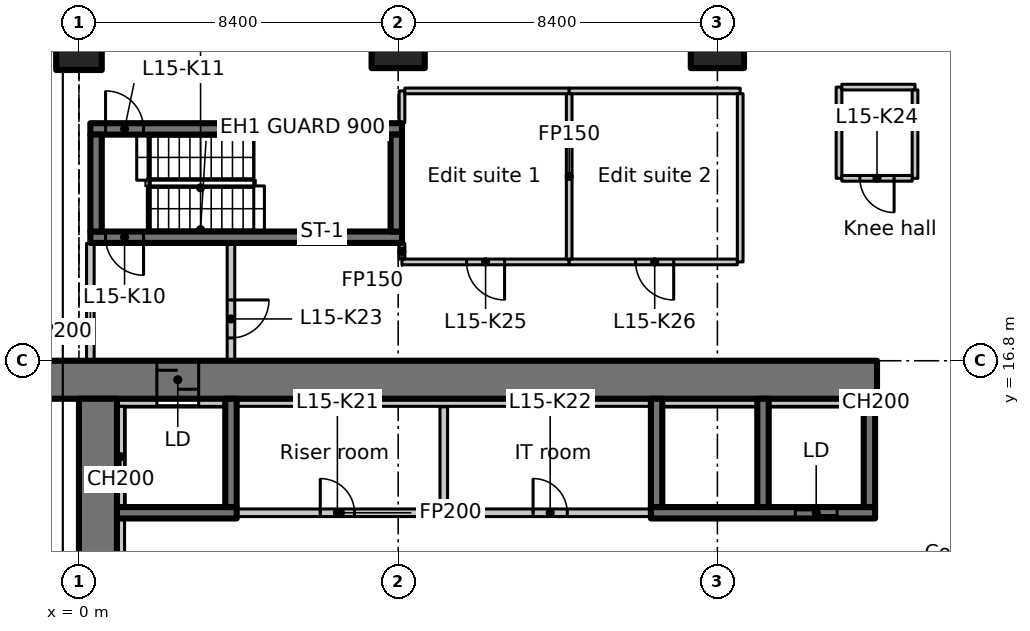
"""IFC4 building model, lengths in metres.
Left out: names, types, materials, properties, quantities, classifications, styles, units other than length and angle.
Written with IfcOpenShell. Run it as: python <this file> out.ifc"""

import sys

from ifc_helpers import new_model, si_unit, direction, frame, frame_2d, origin, origin_2d, place, context, subcontext, project, spatial, rectangle, extrude, element, fill, save


model = new_model("IFC4")
c1 = context("Model", 3, precision=1e-05, world=origin(), true_north=direction((0.0, 1.0)))
c2 = subcontext(c1, "Body", "Model", "MODEL_VIEW")
j1 = project(units=[si_unit("LENGTHUNIT", "METRE"), si_unit("PLANEANGLEUNIT", "RADIAN")], contexts=[c1])
p1 = place(None, origin())
s1 = spatial("IfcSite", under=j1, at=p1, CompositionType="ELEMENT")
p2 = place(p1, origin())
s2 = spatial("IfcBuilding", under=s1, at=p2, CompositionType="ELEMENT")
p3 = place(p2, frame((0.0, 0.0, 68.9)))
s3 = spatial("IfcBuildingStorey", under=s2, at=p3, CompositionType="ELEMENT", Elevation=68.9)
p4 = place(p3, frame((0.0, 25.2, 0.0), z_axis=(0.0, 0.0, 1.0), x_axis=(1.0, 0.0, 0.0)))
e1 = element("IfcColumn", 1, at=p4, inside=s3, PredefinedType="COLUMN", context=c2, shape_type="SweptSolid", body=[
    extrude(rectangle(XDim=1.2, YDim=1.5, at=origin_2d()), origin(), (0.0, 0.0, 1.0), 3.35),
])
for number, where, z_axis, x_axis in (
    (2, (8.4, 25.2, 0.0), (0.0, 0.0, 1.0), (1.0, 0.0, 0.0)),
    (3, (16.8, 25.2, 0.0), (0.0, 0.0, 1.0), (1.0, 0.0, 0.0)),
):
    element("IfcColumn", number, at=place(p3, frame(where, z_axis=z_axis, x_axis=x_axis)), inside=s3, PredefinedType="COLUMN", context=c2, shape_type="SweptSolid", body=[
        extrude(rectangle(XDim=1.4, YDim=1.4, at=origin_2d()), origin(), (0.0, 0.0, 1.0), 3.35),
    ])
p5 = place(p3, frame((-1.1, 16.3, 0.0), z_axis=(0.0, 0.0, 1.0), x_axis=(1.0, 0.0, 0.0)))
e4 = element("IfcWall", 4, at=p5, inside=s3, PredefinedType="SHEAR", context=c2, shape_type="SweptSolid", body=[
    extrude(rectangle(XDim=22.1, YDim=1.0, at=frame_2d((11.05, 0.0))), origin(), (0.0, 0.0, 1.0), 3.35),
])
p6 = place(p5, frame((3.15, 0.0, 0.0)))
e5 = element("IfcOpeningElement", 5, at=p6, cuts=e4, PredefinedType="OPENING", context=c2, shape_type="SweptSolid", body=[
    extrude(rectangle(XDim=1.1, YDim=2.3, at=frame_2d((0.55, 1.15))), frame((0.0, 0.51, 0.0), z_axis=(0.0, -1.0, 0.0), x_axis=(1.0, 0.0, 0.0)), (0.0, 0.0, 1.0), 1.02),
])
p7 = place(p3, frame((0.5, 6.936, 0.0), z_axis=(0.0, 0.0, 1.0), x_axis=(0.0, 1.0, 0.0)))
e6 = element("IfcWall", 6, at=p7, inside=s3, PredefinedType="SHEAR", context=c2, shape_type="SweptSolid", body=[
    extrude(rectangle(XDim=8.864, YDim=1.0, at=frame_2d((4.432, 0.0))), origin(), (0.0, 0.0, 1.0), 3.35),
])
p8 = place(p3, frame((1.0, 15.7, 0.0), z_axis=(0.0, 0.0, 1.0), x_axis=(1.0, 0.0, 0.0)))
e7 = element("IfcWall", 7, at=p8, inside=s3, PredefinedType="PARTITIONING", context=c2, shape_type="SweptSolid", body=[
    extrude(rectangle(XDim=1.05, YDim=0.2, at=frame_2d((0.525, 0.0))), origin(), (0.0, 0.0, 1.0), 3.35),
])
p9 = place(p3, frame((1.0, 12.8, 0.0), z_axis=(0.0, 0.0, 1.0), x_axis=(1.0, 0.0, 0.0)))
e8 = element("IfcWall", 8, at=p9, inside=s3, PredefinedType="SHEAR", context=c2, shape_type="SweptSolid", body=[
    extrude(rectangle(XDim=3.15, YDim=0.3, at=frame_2d((1.575, 0.0))), origin(), (0.0, 0.0, 1.0), 3.35),
])
p10 = place(p3, frame((4.0, 12.95, 0.0), z_axis=(0.0, 0.0, 1.0), x_axis=(0.0, 1.0, 0.0)))
e9 = element("IfcWall", 9, at=p10, inside=s3, PredefinedType="SHEAR", context=c2, shape_type="SweptSolid", body=[
    extrude(rectangle(XDim=2.85, YDim=0.3, at=frame_2d((1.425, 0.0))), origin(), (0.0, 0.0, 1.0), 3.35),
])
p11 = place(p3, frame((15.05, 12.8, 0.0), z_axis=(0.0, 0.0, 1.0), x_axis=(1.0, 0.0, 0.0)))
e10 = element("IfcWall", 10, at=p11, inside=s3, PredefinedType="SHEAR", context=c2, shape_type="SweptSolid", body=[
    extrude(rectangle(XDim=5.9, YDim=0.3, at=frame_2d((2.95, 0.0))), origin(), (0.0, 0.0, 1.0), 3.35),
])
p12 = place(p11, frame((3.8, 0.0, 0.0)))
e11 = element("IfcOpeningElement", 11, at=p12, cuts=e10, PredefinedType="OPENING", context=c2, shape_type="SweptSolid", body=[
    extrude(rectangle(XDim=1.1, YDim=2.3, at=frame_2d((0.55, 1.15))), frame((0.0, 0.16, 0.0), z_axis=(0.0, -1.0, 0.0), x_axis=(1.0, 0.0, 0.0)), (0.0, 0.0, 1.0), 0.32),
])
for number, where, z_axis, x_axis in (
    (12, (15.2, 12.95, 0.0), (0.0, 0.0, 1.0), (0.0, 1.0, 0.0)),
    (13, (18.0, 12.95, 0.0), (0.0, 0.0, 1.0), (0.0, 1.0, 0.0)),
    (14, (20.8, 12.95, 0.0), (0.0, 0.0, 1.0), (0.0, 1.0, 0.0)),
):
    element("IfcWall", number, at=place(p3, frame(where, z_axis=z_axis, x_axis=x_axis)), inside=s3, PredefinedType="SHEAR", context=c2, shape_type="SweptSolid", body=[
        extrude(rectangle(XDim=2.85, YDim=0.3, at=frame_2d((1.425, 0.0))), origin(), (0.0, 0.0, 1.0), 3.35),
    ])
p13 = place(p3, frame((8.5, 20.05, 0.0), z_axis=(0.0, 0.0, 1.0), x_axis=(-1.0, 0.0, 0.0)))
e15 = element("IfcWall", 15, at=p13, inside=s3, PredefinedType="SHEAR", context=c2, shape_type="SweptSolid", body=[
    extrude(rectangle(XDim=8.2, YDim=0.3, at=frame_2d((4.1, 0.0))), origin(), (0.0, 0.0, 1.0), 3.35),
])
p14 = place(p13, frame((6.8, 0.0, 0.0)))
e16 = element("IfcOpeningElement", 16, at=p14, cuts=e15, PredefinedType="OPENING", context=c2, shape_type="SweptSolid", body=[
    extrude(rectangle(XDim=1.0, YDim=2.1, at=frame_2d((0.5, 1.05))), frame((0.0, 0.16, 0.0), z_axis=(0.0, -1.0, 0.0), x_axis=(1.0, 0.0, 0.0)), (0.0, 0.0, 1.0), 0.32),
])
p15 = place(p3, frame((0.3, 22.9, 0.0), z_axis=(0.0, 0.0, 1.0), x_axis=(1.0, 0.0, 0.0)))
e17 = element("IfcWall", 17, at=p15, inside=s3, PredefinedType="SHEAR", context=c2, shape_type="SweptSolid", body=[
    extrude(rectangle(XDim=8.2, YDim=0.3, at=frame_2d((4.1, 0.0))), origin(), (0.0, 0.0, 1.0), 3.35),
])
p16 = place(p15, frame((0.4, 0.0, 0.0)))
e18 = element("IfcOpeningElement", 18, at=p16, cuts=e17, PredefinedType="OPENING", context=c2, shape_type="SweptSolid", body=[
    extrude(rectangle(XDim=1.0, YDim=2.1, at=frame_2d((0.5, 1.05))), frame((0.0, 0.16, 0.0), z_axis=(0.0, -1.0, 0.0), x_axis=(1.0, 0.0, 0.0)), (0.0, 0.0, 1.0), 0.32),
])
for number, where, z_axis, x_axis in (
    (19, (0.45, 20.2, 0.0), (0.0, 0.0, 1.0), (0.0, 1.0, 0.0)),
    (20, (8.35, 20.2, 0.0), (0.0, 0.0, 1.0), (0.0, 1.0, 0.0)),
):
    element("IfcWall", number, at=place(p3, frame(where, z_axis=z_axis, x_axis=x_axis)), inside=s3, PredefinedType="SHEAR", context=c2, shape_type="SweptSolid", body=[
        extrude(rectangle(XDim=2.55, YDim=0.3, at=frame_2d((1.275, 0.0))), origin(), (0.0, 0.0, 1.0), 3.35),
    ])
p17 = place(p3, frame((0.3, 16.812, 0.0), z_axis=(0.0, 0.0, 1.0), x_axis=(0.0, 1.0, 0.0)))
e21 = element("IfcWall", 21, at=p17, inside=s3, PredefinedType="PARTITIONING", context=c2, shape_type="SweptSolid", body=[
    extrude(rectangle(XDim=3.076, YDim=0.2, at=frame_2d((1.538, 0.0))), origin(), (0.0, 0.0, 1.0), 2.98),
])
p18 = place(p3, frame((4.0, 19.888, 0.0), z_axis=(0.0, 0.0, 1.0), x_axis=(0.0, -1.0, 0.0)))
e22 = element("IfcWall", 22, at=p18, inside=s3, PredefinedType="PARTITIONING", context=c2, shape_type="SweptSolid", body=[
    extrude(rectangle(XDim=3.076, YDim=0.2, at=frame_2d((1.538, 0.0))), origin(), (0.0, 0.0, 1.0), 3.35),
])
p19 = place(p18, frame((1.488, 0.0, 0.0)))
e23 = element("IfcOpeningElement", 23, at=p19, cuts=e22, PredefinedType="OPENING", context=c2, shape_type="SweptSolid", body=[
    extrude(rectangle(XDim=1.0, YDim=2.1, at=frame_2d((0.5, 1.05))), frame((0.0, 0.11, 0.0), z_axis=(0.0, -1.0, 0.0), x_axis=(1.0, 0.0, 0.0)), (0.0, 0.0, 1.0), 0.22),
])
p20 = place(p3, frame((4.162, 12.8, 0.0), z_axis=(0.0, 0.0, 1.0), x_axis=(1.0, 0.0, 0.0)))
e24 = element("IfcWall", 24, at=p20, inside=s3, PredefinedType="PARTITIONING", context=c2, shape_type="SweptSolid", body=[
    extrude(rectangle(XDim=5.438, YDim=0.2, at=frame_2d((2.719, 0.0))), origin(), (0.0, 0.0, 1.0), 3.35),
])
p21 = place(p20, frame((2.188, 0.0, 0.0)))
e25 = element("IfcOpeningElement", 25, at=p21, cuts=e24, PredefinedType="OPENING", context=c2, shape_type="SweptSolid", body=[
    extrude(rectangle(XDim=0.9, YDim=2.1, at=frame_2d((0.45, 1.05))), frame((0.0, 0.11, 0.0), z_axis=(0.0, -1.0, 0.0), x_axis=(1.0, 0.0, 0.0)), (0.0, 0.0, 1.0), 0.22),
])
p22 = place(p3, frame((9.6, 12.8, 0.0), z_axis=(0.0, 0.0, 1.0), x_axis=(1.0, 0.0, 0.0)))
e26 = element("IfcWall", 26, at=p22, inside=s3, PredefinedType="PARTITIONING", context=c2, shape_type="SweptSolid", body=[
    extrude(rectangle(XDim=5.438, YDim=0.2, at=frame_2d((2.719, 0.0))), origin(), (0.0, 0.0, 1.0), 3.35),
])
p23 = place(p22, frame((2.35, 0.0, 0.0)))
e27 = element("IfcOpeningElement", 27, at=p23, cuts=e26, PredefinedType="OPENING", context=c2, shape_type="SweptSolid", body=[
    extrude(rectangle(XDim=0.9, YDim=2.1, at=frame_2d((0.45, 1.05))), frame((0.0, 0.11, 0.0), z_axis=(0.0, -1.0, 0.0), x_axis=(1.0, 0.0, 0.0)), (0.0, 0.0, 1.0), 0.22),
])
p24 = place(p3, frame((9.6, 15.588, 0.0), z_axis=(0.0, 0.0, 1.0), x_axis=(0.0, -1.0, 0.0)))
e28 = element("IfcWall", 28, at=p24, inside=s3, PredefinedType="PARTITIONING", context=c2, shape_type="SweptSolid", body=[
    extrude(rectangle(XDim=2.688, YDim=0.2, at=frame_2d((1.344, 0.0))), origin(), (0.0, 0.0, 1.0), 3.35),
])
p25 = place(p3, frame((12.9, 19.4, 0.0), z_axis=(0.0, 0.0, 1.0), x_axis=(-1.0, 0.0, 0.0)))
e29 = element("IfcWall", 29, at=p25, inside=s3, PredefinedType="PARTITIONING", context=c2, shape_type="SweptSolid", body=[
    extrude(rectangle(XDim=4.4, YDim=0.15, at=frame_2d((2.2, 0.0))), origin(), (0.0, 0.0, 1.0), 3.35),
])
p26 = place(p25, frame((1.7, 0.0, 0.0)))
e30 = element("IfcOpeningElement", 30, at=p26, cuts=e29, PredefinedType="OPENING", context=c2, shape_type="SweptSolid", body=[
    extrude(rectangle(XDim=1.0, YDim=2.1, at=frame_2d((0.5, 1.05))), frame((0.0, 0.085, 0.0), z_axis=(0.0, -1.0, 0.0), x_axis=(1.0, 0.0, 0.0)), (0.0, 0.0, 1.0), 0.17),
])
p27 = place(p3, frame((8.5, 19.475, 0.0), z_axis=(0.0, 0.0, 1.0), x_axis=(0.0, 1.0, 0.0)))
e31 = element("IfcWall", 31, at=p27, inside=s3, PredefinedType="PARTITIONING", context=c2, shape_type="SweptSolid", body=[
    extrude(rectangle(XDim=0.413, YDim=0.15, at=frame_2d((0.207, 0.0))), origin(), (0.0, 0.0, 1.0), 3.35),
])
p28 = place(p3, frame((8.5, 23.062, 0.0), z_axis=(0.0, 0.0, 1.0), x_axis=(0.0, 1.0, 0.0)))
e32 = element("IfcWall", 32, at=p28, inside=s3, PredefinedType="PARTITIONING", context=c2, shape_type="SweptSolid", body=[
    extrude(rectangle(XDim=0.838, YDim=0.15, at=frame_2d((0.419, 0.0))), origin(), (0.0, 0.0, 1.0), 3.35),
])
p29 = place(p3, frame((8.575, 23.9, 0.0), z_axis=(0.0, 0.0, 1.0), x_axis=(1.0, 0.0, 0.0)))
e33 = element("IfcWall", 33, at=p29, inside=s3, PredefinedType="PARTITIONING", context=c2, shape_type="SweptSolid", body=[
    extrude(rectangle(XDim=4.325, YDim=0.15, at=frame_2d((2.163, 0.0))), origin(), (0.0, 0.0, 1.0), 3.35),
])
p30 = place(p3, frame((12.9, 23.9, 0.0), z_axis=(0.0, 0.0, 1.0), x_axis=(1.0, 0.0, 0.0)))
e34 = element("IfcWall", 34, at=p30, inside=s3, PredefinedType="PARTITIONING", context=c2, shape_type="SweptSolid", body=[
    extrude(rectangle(XDim=4.5, YDim=0.15, at=frame_2d((2.25, 0.0))), origin(), (0.0, 0.0, 1.0), 3.35),
])
p31 = place(p3, frame((17.4, 23.825, 0.0), z_axis=(0.0, 0.0, 1.0), x_axis=(0.0, -1.0, 0.0)))
e35 = element("IfcWall", 35, at=p31, inside=s3, PredefinedType="PARTITIONING", context=c2, shape_type="SweptSolid", body=[
    extrude(rectangle(XDim=4.425, YDim=0.15, at=frame_2d((2.212, 0.0))), origin(), (0.0, 0.0, 1.0), 3.35),
])
p32 = place(p3, frame((17.325, 19.4, 0.0), z_axis=(0.0, 0.0, 1.0), x_axis=(-1.0, 0.0, 0.0)))
e36 = element("IfcWall", 36, at=p32, inside=s3, PredefinedType="PARTITIONING", context=c2, shape_type="SweptSolid", body=[
    extrude(rectangle(XDim=4.425, YDim=0.15, at=frame_2d((2.212, 0.0))), origin(), (0.0, 0.0, 1.0), 3.35),
])
p33 = place(p32, frame((1.675, 0.0, 0.0)))
e37 = element("IfcOpeningElement", 37, at=p33, cuts=e36, PredefinedType="OPENING", context=c2, shape_type="SweptSolid", body=[
    extrude(rectangle(XDim=1.0, YDim=2.1, at=frame_2d((0.5, 1.05))), frame((0.0, 0.085, 0.0), z_axis=(0.0, -1.0, 0.0), x_axis=(1.0, 0.0, 0.0)), (0.0, 0.0, 1.0), 0.17),
])
p34 = place(p3, frame((12.9, 23.825, 0.0), z_axis=(0.0, 0.0, 1.0), x_axis=(0.0, -1.0, 0.0)))
e38 = element("IfcWall", 38, at=p34, inside=s3, PredefinedType="PARTITIONING", context=c2, shape_type="SweptSolid", body=[
    extrude(rectangle(XDim=4.35, YDim=0.15, at=frame_2d((2.175, 0.0))), origin(), (0.0, 0.0, 1.0), 3.35),
])
p35 = place(p3, frame((20.0, 21.6, 0.0), z_axis=(0.0, 0.0, 1.0), x_axis=(0.0, 1.0, 0.0)))
e39 = element("IfcWall", 39, at=p35, inside=s3, PredefinedType="PARTITIONING", context=c2, shape_type="SweptSolid", body=[
    extrude(rectangle(XDim=2.4, YDim=0.15, at=frame_2d((1.2, 0.0))), origin(), (0.0, 0.0, 1.0), 3.35),
])
p36 = place(p3, frame((20.075, 24.0, 0.0), z_axis=(0.0, 0.0, 1.0), x_axis=(1.0, 0.0, 0.0)))
e40 = element("IfcWall", 40, at=p36, inside=s3, PredefinedType="PARTITIONING", context=c2, shape_type="SweptSolid", body=[
    extrude(rectangle(XDim=1.925, YDim=0.15, at=frame_2d((0.962, 0.0))), origin(), (0.0, 0.0, 1.0), 3.35),
])
p37 = place(p3, frame((22.0, 23.925, 0.0), z_axis=(0.0, 0.0, 1.0), x_axis=(0.0, -1.0, 0.0)))
e41 = element("IfcWall", 41, at=p37, inside=s3, PredefinedType="PARTITIONING", context=c2, shape_type="SweptSolid", body=[
    extrude(rectangle(XDim=2.325, YDim=0.15, at=frame_2d((1.163, 0.0))), origin(), (0.0, 0.0, 1.0), 3.35),
])
p38 = place(p3, frame((21.925, 21.6, 0.0), z_axis=(0.0, 0.0, 1.0), x_axis=(-1.0, 0.0, 0.0)))
e42 = element("IfcWall", 42, at=p38, inside=s3, PredefinedType="PARTITIONING", context=c2, shape_type="SweptSolid", body=[
    extrude(rectangle(XDim=1.85, YDim=0.15, at=frame_2d((0.925, 0.0))), origin(), (0.0, 0.0, 1.0), 3.35),
])
p39 = place(p38, frame((0.475, 0.0, 0.0)))
e43 = element("IfcOpeningElement", 43, at=p39, cuts=e42, PredefinedType="OPENING", context=c2, shape_type="SweptSolid", body=[
    extrude(rectangle(XDim=0.9, YDim=2.1, at=frame_2d((0.45, 1.05))), frame((0.0, 0.085, 0.0), z_axis=(0.0, -1.0, 0.0), x_axis=(1.0, 0.0, 0.0)), (0.0, 0.0, 1.0), 0.17),
])
p40 = place(p3, frame((1.1, 9.75, 0.0), z_axis=(0.0, 0.0, 1.0), x_axis=(0.0, 1.0, 0.0)))
e44 = element("IfcWall", 44, at=p40, inside=s3, PredefinedType="PARTITIONING", context=c2, shape_type="SweptSolid", body=[
    extrude(rectangle(XDim=2.9, YDim=0.2, at=frame_2d((1.45, 0.0))), origin(), (0.0, 0.0, 1.0), 3.35),
])
p41 = place(p3, frame((1.1, 12.95, 0.0), z_axis=(0.0, 0.0, 1.0), x_axis=(0.0, 1.0, 0.0)))
e45 = element("IfcWall", 45, at=p41, inside=s3, PredefinedType="PARTITIONING", context=c2, shape_type="SweptSolid", body=[
    extrude(rectangle(XDim=2.65, YDim=0.2, at=frame_2d((1.325, 0.0))), origin(), (0.0, 0.0, 1.0), 3.35),
])
p42 = place(p3, frame((3.15, 15.7, 0.0), z_axis=(0.0, 0.0, 1.0), x_axis=(1.0, 0.0, 0.0)))
e46 = element("IfcWall", 46, at=p42, inside=s3, PredefinedType="PARTITIONING", context=c2, shape_type="SweptSolid", body=[
    extrude(rectangle(XDim=0.7, YDim=0.2, at=frame_2d((0.35, 0.0))), origin(), (0.0, 0.0, 1.0), 3.35),
])
p43 = place(p3, frame((4.15, 15.7, 0.0), z_axis=(0.0, 0.0, 1.0), x_axis=(1.0, 0.0, 0.0)))
e47 = element("IfcWall", 47, at=p43, inside=s3, PredefinedType="PARTITIONING", context=c2, shape_type="SweptSolid", body=[
    extrude(rectangle(XDim=10.9, YDim=0.2, at=frame_2d((5.45, 0.0))), origin(), (0.0, 0.0, 1.0), 3.35),
])
for number, where, z_axis, x_axis in (
    (48, (15.35, 15.7, 0.0), (0.0, 0.0, 1.0), (1.0, 0.0, 0.0)),
    (49, (18.15, 15.7, 0.0), (0.0, 0.0, 1.0), (1.0, 0.0, 0.0)),
):
    element("IfcWall", number, at=place(p3, frame(where, z_axis=z_axis, x_axis=x_axis)), inside=s3, PredefinedType="PARTITIONING", context=c2, shape_type="SweptSolid", body=[
        extrude(rectangle(XDim=2.5, YDim=0.2, at=frame_2d((1.25, 0.0))), origin(), (0.0, 0.0, 1.0), 3.35),
    ])
p44 = place(p3, frame((20.95, 15.7, 0.0), z_axis=(0.0, 0.0, 1.0), x_axis=(1.0, 0.0, 0.0)))
e50 = element("IfcWall", 50, at=p44, inside=s3, PredefinedType="PARTITIONING", context=c2, shape_type="SweptSolid", body=[
    extrude(rectangle(XDim=0.05, YDim=0.2, at=frame_2d((0.025, 0.0))), origin(), (0.0, 0.0, 1.0), 3.35),
])
p45 = place(p6, origin())
e51 = element("IfcDoor", 51, at=p45, inside=s3, OperationType="SLIDING_TO_LEFT", PredefinedType="DOOR", context=c2, shape_type="SweptSolid", body=[
    extrude(rectangle(XDim=1.1, YDim=2.3, at=frame_2d((0.55, 1.15))), frame((0.0, 0.025, 0.0), z_axis=(0.0, -1.0, 0.0), x_axis=(1.0, 0.0, 0.0)), (0.0, 0.0, 1.0), 0.05),
])
fill(e5, e51)
p46 = place(p12, origin())
e52 = element("IfcDoor", 52, at=p46, inside=s3, OperationType="SLIDING_TO_LEFT", PredefinedType="DOOR", context=c2, shape_type="SweptSolid", body=[
    extrude(rectangle(XDim=1.1, YDim=2.3, at=frame_2d((0.55, 1.15))), frame((0.0, 0.025, 0.0), z_axis=(0.0, -1.0, 0.0), x_axis=(1.0, 0.0, 0.0)), (0.0, 0.0, 1.0), 0.05),
])
fill(e11, e52)
p47 = place(p14, origin())
e53 = element("IfcDoor", 53, at=p47, inside=s3, OperationType="SINGLE_SWING_RIGHT", PredefinedType="DOOR", context=c2, shape_type="SweptSolid", body=[
    extrude(rectangle(XDim=1.0, YDim=2.1, at=frame_2d((0.5, 1.05))), frame((0.0, 0.025, 0.0), z_axis=(0.0, -1.0, 0.0), x_axis=(1.0, 0.0, 0.0)), (0.0, 0.0, 1.0), 0.05),
])
fill(e16, e53)
p48 = place(p16, origin())
e54 = element("IfcDoor", 54, at=p48, inside=s3, OperationType="SINGLE_SWING_LEFT", PredefinedType="DOOR", context=c2, shape_type="SweptSolid", body=[
    extrude(rectangle(XDim=1.0, YDim=2.1, at=frame_2d((0.5, 1.05))), frame((0.0, 0.025, 0.0), z_axis=(0.0, -1.0, 0.0), x_axis=(1.0, 0.0, 0.0)), (0.0, 0.0, 1.0), 0.05),
])
fill(e18, e54)
p49 = place(p21, origin())
e55 = element("IfcDoor", 55, at=p49, inside=s3, OperationType="SINGLE_SWING_LEFT", PredefinedType="DOOR", context=c2, shape_type="SweptSolid", body=[
    extrude(rectangle(XDim=0.9, YDim=2.1, at=frame_2d((0.45, 1.05))), frame((0.0, 0.025, 0.0), z_axis=(0.0, -1.0, 0.0), x_axis=(1.0, 0.0, 0.0)), (0.0, 0.0, 1.0), 0.05),
])
fill(e25, e55)
p50 = place(p23, origin())
e56 = element("IfcDoor", 56, at=p50, inside=s3, OperationType="SINGLE_SWING_RIGHT", PredefinedType="DOOR", context=c2, shape_type="SweptSolid", body=[
    extrude(rectangle(XDim=0.9, YDim=2.1, at=frame_2d((0.45, 1.05))), frame((0.0, 0.025, 0.0), z_axis=(0.0, -1.0, 0.0), x_axis=(1.0, 0.0, 0.0)), (0.0, 0.0, 1.0), 0.05),
])
fill(e27, e56)
p51 = place(p19, origin())
e57 = element("IfcDoor", 57, at=p51, inside=s3, OperationType="SINGLE_SWING_LEFT", PredefinedType="DOOR", context=c2, shape_type="SweptSolid", body=[
    extrude(rectangle(XDim=1.0, YDim=2.1, at=frame_2d((0.5, 1.05))), frame((0.0, 0.025, 0.0), z_axis=(0.0, -1.0, 0.0), x_axis=(1.0, 0.0, 0.0)), (0.0, 0.0, 1.0), 0.05),
])
fill(e23, e57)
p52 = place(p39, origin())
e58 = element("IfcDoor", 58, at=p52, inside=s3, OperationType="SINGLE_SWING_RIGHT", PredefinedType="DOOR", context=c2, shape_type="SweptSolid", body=[
    extrude(rectangle(XDim=0.9, YDim=2.1, at=frame_2d((0.45, 1.05))), frame((0.0, 0.025, 0.0), z_axis=(0.0, -1.0, 0.0), x_axis=(1.0, 0.0, 0.0)), (0.0, 0.0, 1.0), 0.05),
])
fill(e43, e58)
p53 = place(p26, origin())
e59 = element("IfcDoor", 59, at=p53, inside=s3, OperationType="SINGLE_SWING_LEFT", PredefinedType="DOOR", context=c2, shape_type="SweptSolid", body=[
    extrude(rectangle(XDim=1.0, YDim=2.1, at=frame_2d((0.5, 1.05))), frame((0.0, 0.025, 0.0), z_axis=(0.0, -1.0, 0.0), x_axis=(1.0, 0.0, 0.0)), (0.0, 0.0, 1.0), 0.05),
])
fill(e30, e59)
p54 = place(p33, origin())
e60 = element("IfcDoor", 60, at=p54, inside=s3, OperationType="SINGLE_SWING_RIGHT", PredefinedType="DOOR", context=c2, shape_type="SweptSolid", body=[
    extrude(rectangle(XDim=1.0, YDim=2.1, at=frame_2d((0.5, 1.05))), frame((0.0, 0.025, 0.0), z_axis=(0.0, -1.0, 0.0), x_axis=(1.0, 0.0, 0.0)), (0.0, 0.0, 1.0), 0.05),
])
fill(e37, e60)
save(model, sys.argv[1])
